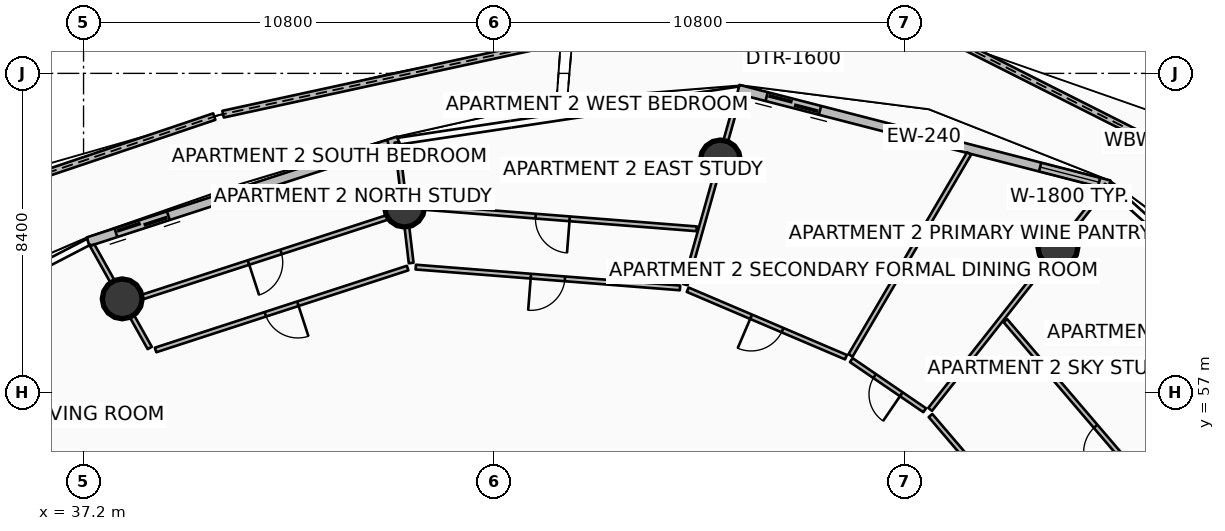
"""IFC4 building model, lengths in metres.
Left out: names, types, materials, properties, quantities, classifications, styles, units other than length and angle.
Written with IfcOpenShell. Run it as: python <this file> out.ifc"""

import sys

from ifc_helpers import new_model, si_unit, direction, frame, frame_2d, origin, origin_2d, place, context, subcontext, project, spatial, polyline, rectangle, circle, outline, extrude, element, fill, save


model = new_model("IFC4")
c1 = context("Model", 3, precision=1e-05, world=origin(), true_north=direction((0.0, 1.0)))
c2 = subcontext(c1, "Body", "Model", "MODEL_VIEW")
j1 = project(units=[si_unit("LENGTHUNIT", "METRE"), si_unit("PLANEANGLEUNIT", "RADIAN")], contexts=[c1])
p1 = place(None, origin())
s1 = spatial("IfcSite", under=j1, at=p1, CompositionType="ELEMENT")
p2 = place(p1, origin())
s2 = spatial("IfcBuilding", under=s1, at=p2, CompositionType="ELEMENT")
p3 = place(p2, frame((0.0, 0.0, 142.8)))
s3 = spatial("IfcBuildingStorey", under=s2, at=p3, CompositionType="ELEMENT", Elevation=142.8)
for number, where, z_axis, x_axis in (
    (1, (62.84, 60.824, 0.0), (0.0, 0.0, 1.0), (1.0, 0.0, 0.0)),
    (2, (53.957, 63.122, 0.0), (0.0, 0.0, 1.0), (1.0, 0.0, 0.0)),
    (3, (45.647, 61.881, 0.0), (0.0, 0.0, 1.0), (1.0, 0.0, 0.0)),
    (4, (38.218, 59.467, 0.0), (0.0, 0.0, 1.0), (1.0, 0.0, 0.0)),
):
    element("IfcColumn", number, at=place(p3, frame(where, z_axis=z_axis, x_axis=x_axis)), inside=s3, PredefinedType="COLUMN", context=c2, shape_type="SweptSolid", body=[
        extrude(circle(Radius=0.525, at=origin_2d()), origin(), (0.0, 0.0, 1.0), 3.5),
    ])
p4 = place(p3, frame((70.17, 61.17, 0.0), z_axis=(0.0, 0.0, 1.0), x_axis=(-0.892736735019, 0.450578652344, 0.0)))
e5 = element("IfcWall", 5, at=p4, inside=s3, PredefinedType="PARAPET", context=c2, shape_type="SweptSolid", body=[
    extrude(outline(polyline([(0.0, 0.0), (10.93, 0.0), (10.93, 1.348), (5.465, 1.562), (0.0, 1.747), (0.0, 0.0)])), frame((0.0, 0.09, 0.0), z_axis=(0.0, -1.0, 0.0), x_axis=(1.0, 0.0, 0.0)), (0.0, 0.0, 1.0), 0.18),
])
p5 = place(p3, frame((49.76, 66.259, 0.0), z_axis=(0.0, 0.0, 1.0), x_axis=(-0.977181934864, -0.212404016384, 0.0)))
e6 = element("IfcWall", 6, at=p5, inside=s3, PredefinedType="PARAPET", context=c2, shape_type="SweptSolid", body=[
    extrude(outline(polyline([(0.0, 0.0), (9.096, 0.0), (9.096, 1.348), (4.548, 1.182), (0.0, 1.12), (0.0, 0.0)])), frame((0.0, 0.09, 0.0), z_axis=(0.0, -1.0, 0.0), x_axis=(1.0, 0.0, 0.0)), (0.0, 0.0, 1.0), 0.18),
])
p6 = place(p3, frame((40.64, 64.263, 0.0), z_axis=(0.0, 0.0, 1.0), x_axis=(-0.947571676397, -0.319543296113, 0.0)))
e7 = element("IfcWall", 7, at=p6, inside=s3, PredefinedType="PARAPET", context=c2, shape_type="SweptSolid", body=[
    extrude(outline(polyline([(0.0, 0.0), (9.383, 0.0), (9.383, 1.747), (4.691, 1.562), (0.0, 1.348), (0.0, 0.0)])), frame((0.0, 0.09, 0.0), z_axis=(0.0, -1.0, 0.0), x_axis=(1.0, 0.0, 0.0)), (0.0, 0.0, 1.0), 0.18),
])
p7 = place(p3, frame((64.192, 62.466, 0.0), z_axis=(0.0, 0.0, 1.0), x_axis=(-0.968379685126, 0.249481032214, 0.0)))
e8 = element("IfcWall", 8, at=p7, inside=s3, PredefinedType="SOLIDWALL", context=c2, shape_type="SweptSolid", body=[
    extrude(rectangle(XDim=10.082, YDim=0.24, at=frame_2d((5.041, 0.0))), origin(), (0.0, 0.0, 1.0), 2.45),
])
p8 = place(p7, frame((7.862, 0.0, 0.0)))
e9 = element("IfcOpeningElement", 9, at=p8, cuts=e8, PredefinedType="OPENING", context=c2, shape_type="SweptSolid", body=[
    extrude(rectangle(XDim=1.45, YDim=2.15, at=frame_2d((0.725, 1.075))), frame((0.0, 0.13, 0.0), z_axis=(0.0, -1.0, 0.0), x_axis=(1.0, 0.0, 0.0)), (0.0, 0.0, 1.0), 0.26),
])
p9 = place(p7, frame((0.28, 0.0, 0.65)))
e10 = element("IfcOpeningElement", 10, at=p9, cuts=e8, PredefinedType="OPENING", context=c2, shape_type="SweptSolid", body=[
    extrude(rectangle(XDim=1.6, YDim=1.5, at=frame_2d((0.8, 0.75))), frame((0.0, 0.13, 0.0), z_axis=(0.0, -1.0, 0.0), x_axis=(1.0, 0.0, 0.0)), (0.0, 0.0, 1.0), 0.26),
])
p10 = place(p3, frame((45.49, 63.624, 0.0), z_axis=(0.0, 0.0, 1.0), x_axis=(-0.951046390632, -0.309048156224, 0.0)))
e11 = element("IfcWall", 11, at=p10, inside=s3, PredefinedType="SOLIDWALL", context=c2, shape_type="SweptSolid", body=[
    extrude(rectangle(XDim=8.59, YDim=0.24, at=frame_2d((4.295, 0.0))), origin(), (0.0, 0.0, 1.0), 2.45),
])
p11 = place(p10, frame((6.37, 0.0, 0.0)))
e12 = element("IfcOpeningElement", 12, at=p11, cuts=e11, PredefinedType="OPENING", context=c2, shape_type="SweptSolid", body=[
    extrude(rectangle(XDim=1.45, YDim=2.15, at=frame_2d((0.725, 1.075))), frame((0.0, 0.13, 0.0), z_axis=(0.0, -1.0, 0.0), x_axis=(1.0, 0.0, 0.0)), (0.0, 0.0, 1.0), 0.26),
])
p12 = place(p10, frame((0.28, 0.0, 0.65)))
e13 = element("IfcOpeningElement", 13, at=p12, cuts=e11, PredefinedType="OPENING", context=c2, shape_type="SweptSolid", body=[
    extrude(rectangle(XDim=1.6, YDim=1.5, at=frame_2d((0.8, 0.75))), frame((0.0, 0.13, 0.0), z_axis=(0.0, -1.0, 0.0), x_axis=(1.0, 0.0, 0.0)), (0.0, 0.0, 1.0), 0.26),
])
p13 = place(p3, frame((64.017, 51.093, 0.0), z_axis=(0.0, 0.0, 1.0), x_axis=(-0.649447060425, 0.76040680935, 0.0)))
e14 = element("IfcWall", 14, at=p13, inside=s3, PredefinedType="PARTITIONING", context=c2, shape_type="SweptSolid", body=[
    extrude(rectangle(XDim=6.975, YDim=0.125, at=frame_2d((3.487, 0.0))), origin(), (0.0, 0.0, 1.0), 2.94),
])
p14 = place(p13, frame((3.037, 0.0, 0.0)))
e15 = element("IfcOpeningElement", 15, at=p14, cuts=e14, PredefinedType="OPENING", context=c2, shape_type="SweptSolid", body=[
    extrude(rectangle(XDim=0.9, YDim=2.08, at=frame_2d((0.45, 1.04))), frame((0.0, 0.073, 0.0), z_axis=(0.0, -1.0, 0.0), x_axis=(1.0, 0.0, 0.0)), (0.0, 0.0, 1.0), 0.145),
])
p15 = place(p3, frame((66.792, 52.648, 0.0), z_axis=(0.0, 0.0, 1.0), x_axis=(-0.649446834215, 0.76040700255, 0.0)))
e16 = element("IfcWall", 16, at=p15, inside=s3, PredefinedType="PARTITIONING", context=c2, shape_type="SweptSolid", body=[
    extrude(rectangle(XDim=8.216, YDim=0.125, at=frame_2d((4.108, 0.0))), origin(), (0.0, 0.0, 1.0), 2.94),
])
p16 = place(p15, frame((3.658, 0.0, 0.0)))
e17 = element("IfcOpeningElement", 17, at=p16, cuts=e16, PredefinedType="OPENING", context=c2, shape_type="SweptSolid", body=[
    extrude(rectangle(XDim=0.9, YDim=2.08, at=frame_2d((0.45, 1.04))), frame((0.0, 0.073, 0.0), z_axis=(0.0, -1.0, 0.0), x_axis=(1.0, 0.0, 0.0)), (0.0, 0.0, 1.0), 0.145),
])
p17 = place(p3, frame((59.477, 56.559, 0.0), z_axis=(0.0, 0.0, 1.0), x_axis=(0.619110986016, 0.785303499925, 0.0)))
e18 = element("IfcWall", 18, at=p17, inside=s3, PredefinedType="PARTITIONING", context=c2, shape_type="SweptSolid", body=[
    extrude(rectangle(XDim=7.513, YDim=0.125, at=frame_2d((3.756, 0.0))), origin(), (0.0, 0.0, 1.0), 2.94),
])
p18 = place(p3, frame((57.382, 57.978, 0.0), z_axis=(0.0, 0.0, 1.0), x_axis=(0.506339561396, 0.862334186128, 0.0)))
e19 = element("IfcWall", 19, at=p18, inside=s3, PredefinedType="PARTITIONING", context=c2, shape_type="SweptSolid", body=[
    extrude(rectangle(XDim=6.163, YDim=0.125, at=frame_2d((3.081, 0.0))), origin(), (0.0, 0.0, 1.0), 2.94),
])
p19 = place(p3, frame((59.333, 56.537, 0.0), z_axis=(0.0, 0.0, 1.0), x_axis=(-0.825780816813, 0.563991172434, 0.0)))
e20 = element("IfcWall", 20, at=p19, inside=s3, PredefinedType="PARTITIONING", context=c2, shape_type="SweptSolid", body=[
    extrude(rectangle(XDim=2.338, YDim=0.125, at=frame_2d((1.169, 0.0))), origin(), (0.0, 0.0, 1.0), 2.94),
])
p20 = place(p19, frame((0.744, 0.0, 0.0)))
e21 = element("IfcOpeningElement", 21, at=p20, cuts=e20, PredefinedType="OPENING", context=c2, shape_type="SweptSolid", body=[
    extrude(rectangle(XDim=0.85, YDim=2.06, at=frame_2d((0.425, 1.03))), frame((0.0, 0.073, 0.0), z_axis=(0.0, -1.0, 0.0), x_axis=(1.0, 0.0, 0.0)), (0.0, 0.0, 1.0), 0.145),
])
p21 = place(p3, frame((57.263, 57.932, 0.0), z_axis=(0.0, 0.0, 1.0), x_axis=(-0.919910192906, 0.392129107549, 0.0)))
e22 = element("IfcWall", 22, at=p21, inside=s3, PredefinedType="PARTITIONING", context=c2, shape_type="SweptSolid", body=[
    extrude(rectangle(XDim=4.528, YDim=0.125, at=frame_2d((2.264, 0.0))), origin(), (0.0, 0.0, 1.0), 2.94),
])
p22 = place(p21, frame((1.814, 0.0, 0.0)))
e23 = element("IfcOpeningElement", 23, at=p22, cuts=e22, PredefinedType="OPENING", context=c2, shape_type="SweptSolid", body=[
    extrude(rectangle(XDim=0.9, YDim=2.08, at=frame_2d((0.45, 1.04))), frame((0.0, 0.073, 0.0), z_axis=(0.0, -1.0, 0.0), x_axis=(1.0, 0.0, 0.0)), (0.0, 0.0, 1.0), 0.145),
])
p23 = place(p3, frame((53.032, 59.843, 0.0), z_axis=(0.0, 0.0, 1.0), x_axis=(0.271445669276, 0.962453764412, 0.0)))
e24 = element("IfcWall", 24, at=p23, inside=s3, PredefinedType="PARTITIONING", context=c2, shape_type="SweptSolid", body=[
    extrude(rectangle(XDim=5.2, YDim=0.125, at=frame_2d((2.6, 0.0))), origin(), (0.0, 0.0, 1.0), 2.94),
])
p24 = place(p3, frame((52.896, 59.755, 0.0), z_axis=(0.0, 0.0, 1.0), x_axis=(-0.996918496177, 0.078444324085, 0.0)))
e25 = element("IfcWall", 25, at=p24, inside=s3, PredefinedType="PARTITIONING", context=c2, shape_type="SweptSolid", body=[
    extrude(rectangle(XDim=6.975, YDim=0.125, at=frame_2d((3.487, 0.0))), origin(), (0.0, 0.0, 1.0), 2.94),
])
p25 = place(p24, frame((3.037, 0.0, 0.0)))
e26 = element("IfcOpeningElement", 26, at=p25, cuts=e25, PredefinedType="OPENING", context=c2, shape_type="SweptSolid", body=[
    extrude(rectangle(XDim=0.9, YDim=2.08, at=frame_2d((0.45, 1.04))), frame((0.0, 0.073, 0.0), z_axis=(0.0, -1.0, 0.0), x_axis=(1.0, 0.0, 0.0)), (0.0, 0.0, 1.0), 0.145),
])
p26 = place(p3, frame((53.334, 61.31, 0.0), z_axis=(0.0, 0.0, 1.0), x_axis=(-0.996916945499, 0.078464028559, 0.0)))
e27 = element("IfcWall", 27, at=p26, inside=s3, PredefinedType="PARTITIONING", context=c2, shape_type="SweptSolid", body=[
    extrude(rectangle(XDim=7.604, YDim=0.125, at=frame_2d((3.802, 0.0))), origin(), (0.0, 0.0, 1.0), 2.94),
])
p27 = place(p26, frame((3.352, 0.0, 0.0)))
e28 = element("IfcOpeningElement", 28, at=p27, cuts=e27, PredefinedType="OPENING", context=c2, shape_type="SweptSolid", body=[
    extrude(rectangle(XDim=0.9, YDim=2.08, at=frame_2d((0.45, 1.04))), frame((0.0, 0.073, 0.0), z_axis=(0.0, -1.0, 0.0), x_axis=(1.0, 0.0, 0.0)), (0.0, 0.0, 1.0), 0.145),
])
p28 = place(p3, frame((45.821, 60.41, 0.0), z_axis=(0.0, 0.0, 1.0), x_axis=(-0.117497237937, 0.993073209324, 0.0)))
e29 = element("IfcWall", 29, at=p28, inside=s3, PredefinedType="PARTITIONING", context=c2, shape_type="SweptSolid", body=[
    extrude(rectangle(XDim=3.196, YDim=0.125, at=frame_2d((1.598, 0.0))), origin(), (0.0, 0.0, 1.0), 2.94),
])
p29 = place(p3, frame((38.941, 58.175, 0.0), z_axis=(0.0, 0.0, 1.0), x_axis=(-0.488620181058, 0.872496600946, 0.0)))
e30 = element("IfcWall", 30, at=p29, inside=s3, PredefinedType="PARTITIONING", context=c2, shape_type="SweptSolid", body=[
    extrude(rectangle(XDim=3.095, YDim=0.125, at=frame_2d((1.548, 0.0))), origin(), (0.0, 0.0, 1.0), 2.94),
])
p30 = place(p3, frame((45.728, 60.277, 0.0), z_axis=(0.0, 0.0, 1.0), x_axis=(-0.951064162215, -0.308993461661, 0.0)))
e31 = element("IfcWall", 31, at=p30, inside=s3, PredefinedType="PARTITIONING", context=c2, shape_type="SweptSolid", body=[
    extrude(rectangle(XDim=6.974, YDim=0.125, at=frame_2d((3.487, 0.0))), origin(), (0.0, 0.0, 1.0), 2.94),
])
p31 = place(p30, frame((3.037, 0.0, 0.0)))
e32 = element("IfcOpeningElement", 32, at=p31, cuts=e31, PredefinedType="OPENING", context=c2, shape_type="SweptSolid", body=[
    extrude(rectangle(XDim=0.9, YDim=2.08, at=frame_2d((0.45, 1.04))), frame((0.0, 0.073, 0.0), z_axis=(0.0, -1.0, 0.0), x_axis=(1.0, 0.0, 0.0)), (0.0, 0.0, 1.0), 0.145),
])
p32 = place(p3, frame((45.556, 61.728, 0.0), z_axis=(0.0, 0.0, 1.0), x_axis=(-0.951060224054, -0.309005582834, 0.0)))
e33 = element("IfcWall", 33, at=p32, inside=s3, PredefinedType="PARTITIONING", context=c2, shape_type="SweptSolid", body=[
    extrude(rectangle(XDim=7.544, YDim=0.125, at=frame_2d((3.772, 0.0))), origin(), (0.0, 0.0, 1.0), 2.94),
])
p33 = place(p32, frame((3.322, 0.0, 0.0)))
e34 = element("IfcOpeningElement", 34, at=p33, cuts=e33, PredefinedType="OPENING", context=c2, shape_type="SweptSolid", body=[
    extrude(rectangle(XDim=0.9, YDim=2.08, at=frame_2d((0.45, 1.04))), frame((0.0, 0.073, 0.0), z_axis=(0.0, -1.0, 0.0), x_axis=(1.0, 0.0, 0.0)), (0.0, 0.0, 1.0), 0.145),
])
p34 = place(p8, origin())
e35 = element("IfcDoor", 35, at=p34, inside=s3, OperationType="DOUBLE_DOOR_SLIDING", PredefinedType="DOOR", context=c2, shape_type="SweptSolid", body=[
    extrude(rectangle(XDim=1.45, YDim=2.15, at=frame_2d((0.725, 1.075))), frame((0.0, 0.025, 0.0), z_axis=(0.0, -1.0, 0.0), x_axis=(1.0, 0.0, 0.0)), (0.0, 0.0, 1.0), 0.05),
])
fill(e9, e35)
p35 = place(p9, origin())
e36 = element("IfcWindow", 36, at=p35, inside=s3, PartitioningType="SINGLE_PANEL", PredefinedType="WINDOW", context=c2, shape_type="SweptSolid", body=[
    extrude(rectangle(XDim=1.6, YDim=1.5, at=frame_2d((0.8, 0.75))), frame((0.0, 0.03, 0.0), z_axis=(0.0, -1.0, 0.0), x_axis=(1.0, 0.0, 0.0)), (0.0, 0.0, 1.0), 0.06),
])
fill(e10, e36)
p36 = place(p11, origin())
e37 = element("IfcDoor", 37, at=p36, inside=s3, OperationType="DOUBLE_DOOR_SLIDING", PredefinedType="DOOR", context=c2, shape_type="SweptSolid", body=[
    extrude(rectangle(XDim=1.45, YDim=2.15, at=frame_2d((0.725, 1.075))), frame((0.0, 0.025, 0.0), z_axis=(0.0, -1.0, 0.0), x_axis=(1.0, 0.0, 0.0)), (0.0, 0.0, 1.0), 0.05),
])
fill(e12, e37)
p37 = place(p12, origin())
e38 = element("IfcWindow", 38, at=p37, inside=s3, PartitioningType="SINGLE_PANEL", PredefinedType="WINDOW", context=c2, shape_type="SweptSolid", body=[
    extrude(rectangle(XDim=1.6, YDim=1.5, at=frame_2d((0.8, 0.75))), frame((0.0, 0.03, 0.0), z_axis=(0.0, -1.0, 0.0), x_axis=(1.0, 0.0, 0.0)), (0.0, 0.0, 1.0), 0.06),
])
fill(e13, e38)
p38 = place(p16, origin())
e39 = element("IfcDoor", 39, at=p38, inside=s3, OperationType="SINGLE_SWING_LEFT", PredefinedType="DOOR", context=c2, shape_type="SweptSolid", body=[
    extrude(rectangle(XDim=0.9, YDim=2.08, at=frame_2d((0.45, 1.04))), frame((0.0, 0.025, 0.0), z_axis=(0.0, -1.0, 0.0), x_axis=(1.0, 0.0, 0.0)), (0.0, 0.0, 1.0), 0.05),
])
fill(e17, e39)
p39 = place(p20, origin())
e40 = element("IfcDoor", 40, at=p39, inside=s3, OperationType="SINGLE_SWING_LEFT", PredefinedType="DOOR", context=c2, shape_type="SweptSolid", body=[
    extrude(rectangle(XDim=0.85, YDim=2.06, at=frame_2d((0.425, 1.03))), frame((0.0, 0.025, 0.0), z_axis=(0.0, -1.0, 0.0), x_axis=(1.0, 0.0, 0.0)), (0.0, 0.0, 1.0), 0.05),
])
fill(e21, e40)
p40 = place(p22, origin())
e41 = element("IfcDoor", 41, at=p40, inside=s3, OperationType="SINGLE_SWING_RIGHT", PredefinedType="DOOR", context=c2, shape_type="SweptSolid", body=[
    extrude(rectangle(XDim=0.9, YDim=2.08, at=frame_2d((0.45, 1.04))), frame((0.0, 0.025, 0.0), z_axis=(0.0, -1.0, 0.0), x_axis=(1.0, 0.0, 0.0)), (0.0, 0.0, 1.0), 0.05),
])
fill(e23, e41)
p41 = place(p25, origin())
e42 = element("IfcDoor", 42, at=p41, inside=s3, OperationType="SINGLE_SWING_RIGHT", PredefinedType="DOOR", context=c2, shape_type="SweptSolid", body=[
    extrude(rectangle(XDim=0.9, YDim=2.08, at=frame_2d((0.45, 1.04))), frame((0.0, 0.025, 0.0), z_axis=(0.0, -1.0, 0.0), x_axis=(1.0, 0.0, 0.0)), (0.0, 0.0, 1.0), 0.05),
])
fill(e26, e42)
p42 = place(p27, origin())
e43 = element("IfcDoor", 43, at=p42, inside=s3, OperationType="SINGLE_SWING_LEFT", PredefinedType="DOOR", context=c2, shape_type="SweptSolid", body=[
    extrude(rectangle(XDim=0.9, YDim=2.08, at=frame_2d((0.45, 1.04))), frame((0.0, 0.025, 0.0), z_axis=(0.0, -1.0, 0.0), x_axis=(1.0, 0.0, 0.0)), (0.0, 0.0, 1.0), 0.05),
])
fill(e28, e43)
p43 = place(p31, origin())
e44 = element("IfcDoor", 44, at=p43, inside=s3, OperationType="SINGLE_SWING_LEFT", PredefinedType="DOOR", context=c2, shape_type="SweptSolid", body=[
    extrude(rectangle(XDim=0.9, YDim=2.08, at=frame_2d((0.45, 1.04))), frame((0.0, 0.025, 0.0), z_axis=(0.0, -1.0, 0.0), x_axis=(1.0, 0.0, 0.0)), (0.0, 0.0, 1.0), 0.05),
])
fill(e32, e44)
p44 = place(p33, origin())
e45 = element("IfcDoor", 45, at=p44, inside=s3, OperationType="SINGLE_SWING_RIGHT", PredefinedType="DOOR", context=c2, shape_type="SweptSolid", body=[
    extrude(rectangle(XDim=0.9, YDim=2.08, at=frame_2d((0.45, 1.04))), frame((0.0, 0.025, 0.0), z_axis=(0.0, -1.0, 0.0), x_axis=(1.0, 0.0, 0.0)), (0.0, 0.0, 1.0), 0.05),
])
fill(e34, e45)
save(model, sys.argv[1])
